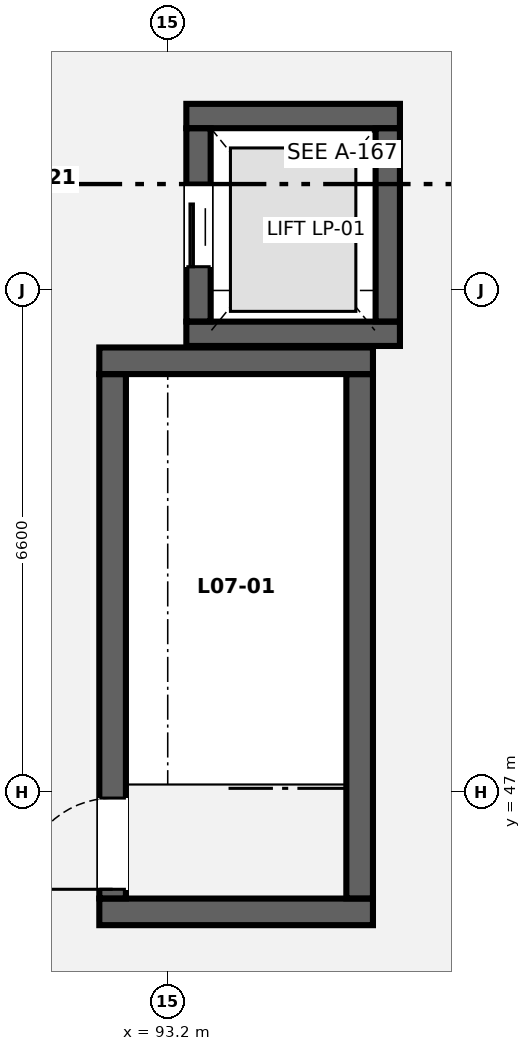
"""IFC4 building model, lengths in metres.
Left out: names, types, materials, properties, quantities, classifications, styles, units other than length and angle.
Written with IfcOpenShell. Run it as: python <this file> out.ifc"""

import sys

from ifc_helpers import new_model, si_unit, direction, frame, frame_2d, origin, place, context, subcontext, project, spatial, rectangle, extrude, element, fill, save


model = new_model("IFC4")
c1 = context("Model", 3, precision=1e-05, world=origin(), true_north=direction((0.0, 1.0)))
c2 = subcontext(c1, "Body", "Model", "MODEL_VIEW")
j1 = project(units=[si_unit("LENGTHUNIT", "METRE"), si_unit("PLANEANGLEUNIT", "RADIAN")], contexts=[c1])
p1 = place(None, origin())
s1 = spatial("IfcSite", under=j1, at=p1, CompositionType="ELEMENT")
p2 = place(p1, origin())
s2 = spatial("IfcBuilding", under=s1, at=p2, CompositionType="ELEMENT")
p3 = place(p2, frame((0.0, 0.0, 30.1)))
s3 = spatial("IfcBuildingStorey", under=s2, at=p3, CompositionType="ELEMENT", Elevation=30.1)
for number, where, z_axis, x_axis in (
    (1, (92.3, 45.425, 0.0), (0.0, 0.0, 1.0), (1.0, 0.0, 0.0)),
    (2, (92.3, 52.675, 0.0), (0.0, 0.0, 1.0), (1.0, 0.0, 0.0)),
):
    element("IfcWall", number, at=place(p3, frame(where, z_axis=z_axis, x_axis=x_axis)), inside=s3, PredefinedType="SHEAR", context=c2, shape_type="SweptSolid", body=[
        extrude(rectangle(XDim=3.6, YDim=0.35, at=frame_2d((1.8, 0.0))), origin(), (0.0, 0.0, 1.0), 4.0),
    ])
p4 = place(p3, frame((92.475, 45.602, 0.0), z_axis=(0.0, 0.0, 1.0), x_axis=(0.0, 1.0, 0.0)))
e3 = element("IfcWall", 3, at=p4, inside=s3, PredefinedType="SHEAR", context=c2, shape_type="SweptSolid", body=[
    extrude(rectangle(XDim=6.896, YDim=0.35, at=frame_2d((3.448, 0.0))), origin(), (0.0, 0.0, 1.0), 4.0),
])
p5 = place(p4, frame((0.12, 0.0, 0.0)))
e4 = element("IfcOpeningElement", 4, at=p5, cuts=e3, PredefinedType="OPENING", context=c2, shape_type="SweptSolid", body=[
    extrude(rectangle(XDim=1.2, YDim=2.15, at=frame_2d((0.6, 1.075))), frame((0.0, 0.185, 0.0), z_axis=(0.0, -1.0, 0.0), x_axis=(1.0, 0.0, 0.0)), (0.0, 0.0, 1.0), 0.37),
])
p6 = place(p3, frame((95.725, 45.602, 0.0), z_axis=(0.0, 0.0, 1.0), x_axis=(0.0, 1.0, 0.0)))
e5 = element("IfcWall", 5, at=p6, inside=s3, PredefinedType="SHEAR", context=c2, shape_type="SweptSolid", body=[
    extrude(rectangle(XDim=6.896, YDim=0.35, at=frame_2d((3.448, 0.0))), origin(), (0.0, 0.0, 1.0), 4.0),
])
for number, where, z_axis, x_axis in (
    (6, (93.445, 53.03, 0.0), (0.0, 0.0, 1.0), (1.0, 0.0, 0.0)),
    (7, (93.445, 55.895, 0.0), (0.0, 0.0, 1.0), (1.0, 0.0, 0.0)),
):
    element("IfcWall", number, at=place(p3, frame(where, z_axis=z_axis, x_axis=x_axis)), inside=s3, PredefinedType="SHEAR", context=c2, shape_type="SweptSolid", body=[
        extrude(rectangle(XDim=2.81, YDim=0.32, at=frame_2d((1.405, 0.0))), origin(), (0.0, 0.0, 1.0), 4.0),
    ])
p7 = place(p3, frame((93.605, 53.192, 0.0), z_axis=(0.0, 0.0, 1.0), x_axis=(0.0, 1.0, 0.0)))
e8 = element("IfcWall", 8, at=p7, inside=s3, PredefinedType="SHEAR", context=c2, shape_type="SweptSolid", body=[
    extrude(rectangle(XDim=2.541, YDim=0.32, at=frame_2d((1.271, 0.0))), origin(), (0.0, 0.0, 1.0), 4.0),
])
p8 = place(p7, frame((0.72, 0.0, 0.0)))
e9 = element("IfcOpeningElement", 9, at=p8, cuts=e8, PredefinedType="OPENING", context=c2, shape_type="SweptSolid", body=[
    extrude(rectangle(XDim=1.1, YDim=2.15, at=frame_2d((0.55, 1.075))), frame((0.0, 0.17, 0.0), z_axis=(0.0, -1.0, 0.0), x_axis=(1.0, 0.0, 0.0)), (0.0, 0.0, 1.0), 0.34),
])
p9 = place(p3, frame((96.095, 53.192, 0.0), z_axis=(0.0, 0.0, 1.0), x_axis=(0.0, 1.0, 0.0)))
e10 = element("IfcWall", 10, at=p9, inside=s3, PredefinedType="SHEAR", context=c2, shape_type="SweptSolid", body=[
    extrude(rectangle(XDim=2.541, YDim=0.32, at=frame_2d((1.271, 0.0))), origin(), (0.0, 0.0, 1.0), 4.0),
])
p10 = place(p5, origin())
e11 = element("IfcDoor", 11, at=p10, inside=s3, OperationType="SINGLE_SWING_LEFT", PredefinedType="DOOR", context=c2, shape_type="SweptSolid", body=[
    extrude(rectangle(XDim=1.2, YDim=2.15, at=frame_2d((0.6, 1.075))), frame((0.0, 0.025, 0.0), z_axis=(0.0, -1.0, 0.0), x_axis=(1.0, 0.0, 0.0)), (0.0, 0.0, 1.0), 0.05),
])
fill(e4, e11)
p11 = place(p8, origin())
e12 = element("IfcDoor", 12, at=p11, inside=s3, OperationType="SLIDING_TO_LEFT", PredefinedType="DOOR", context=c2, shape_type="SweptSolid", body=[
    extrude(rectangle(XDim=1.1, YDim=2.15, at=frame_2d((0.55, 1.075))), frame((0.0, 0.025, 0.0), z_axis=(0.0, -1.0, 0.0), x_axis=(1.0, 0.0, 0.0)), (0.0, 0.0, 1.0), 0.05),
])
fill(e9, e12)
save(model, sys.argv[1])
